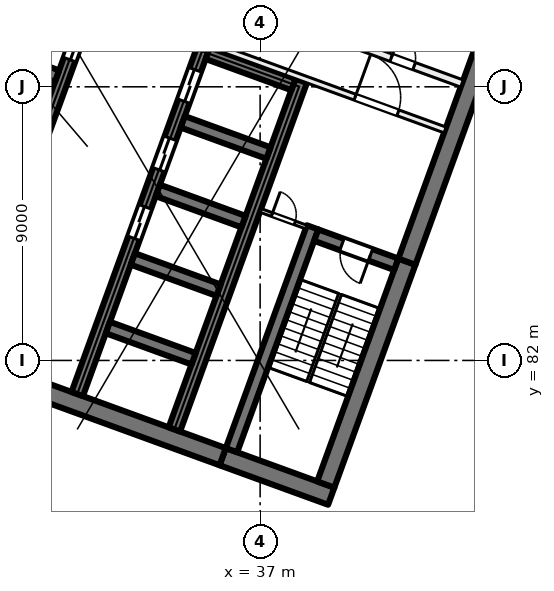
"""IFC4 building model, lengths in metres.
Left out: names, types, materials, properties, quantities, classifications, styles, units other than length and angle.
Written with IfcOpenShell. Run it as: python <this file> out.ifc"""

import sys

from ifc_helpers import new_model, si_unit, direction, frame, frame_2d, origin, place, context, subcontext, project, spatial, rectangle, extrude, element, fill, save


model = new_model("IFC4")
c1 = context("Model", 3, precision=1e-05, world=origin(), true_north=direction((0.0, 1.0)))
c2 = subcontext(c1, "Body", "Model", "MODEL_VIEW")
j1 = project(units=[si_unit("LENGTHUNIT", "METRE"), si_unit("PLANEANGLEUNIT", "RADIAN")], contexts=[c1])
p1 = place(None, origin())
s1 = spatial("IfcSite", under=j1, at=p1, CompositionType="ELEMENT")
p2 = place(p1, origin())
s2 = spatial("IfcBuilding", under=s1, at=p2, CompositionType="ELEMENT")
p3 = place(p2, frame((0.0, 0.0, 31.5)))
s3 = spatial("IfcBuildingStorey", under=s2, at=p3, CompositionType="ELEMENT", Elevation=31.5)
p4 = place(p3, frame((39.338, 77.535, 0.0), z_axis=(0.0, 0.0, 1.0), x_axis=(-0.939701471648, 0.341995824804, 0.0)))
e1 = element("IfcWall", 1, at=p4, inside=s3, PredefinedType="SHEAR", context=c2, shape_type="SweptSolid", body=[
    extrude(rectangle(XDim=3.8, YDim=0.6, at=frame_2d((1.9, 0.0))), origin(), (0.0, 0.0, 1.0), 4.0),
])
p5 = place(p3, frame((35.767, 78.835, 0.0), z_axis=(0.0, 0.0, 1.0), x_axis=(-0.939692894512, 0.342019391267, 0.0)))
e2 = element("IfcWall", 2, at=p5, inside=s3, PredefinedType="SHEAR", context=c2, shape_type="SweptSolid", body=[
    extrude(rectangle(XDim=14.4, YDim=0.6, at=frame_2d((7.2, 0.0))), origin(), (0.0, 0.0, 1.0), 4.0),
])
p6 = place(p3, frame((39.159, 77.92, 0.0), z_axis=(0.0, 0.0, 1.0), x_axis=(0.342016982193, 0.939693771338, 0.0)))
e3 = element("IfcWall", 3, at=p6, inside=s3, PredefinedType="SHEAR", context=c2, shape_type="SweptSolid", body=[
    extrude(rectangle(XDim=7.8, YDim=0.6, at=frame_2d((3.9, 0.0))), origin(), (0.0, 0.0, 1.0), 4.0),
])
p7 = place(p3, frame((41.827, 85.249, 0.0), z_axis=(0.0, 0.0, 1.0), x_axis=(0.342016162452, 0.939694069696, 0.0)))
e4 = element("IfcWall", 4, at=p7, inside=s3, PredefinedType="SHEAR", context=c2, shape_type="SweptSolid", body=[
    extrude(rectangle(XDim=8.9, YDim=0.6, at=frame_2d((4.45, 0.0))), origin(), (0.0, 0.0, 1.0), 4.0),
])
p8 = place(p3, frame((36.058, 79.048, 0.0), z_axis=(0.0, 0.0, 1.0), x_axis=(0.342016982193, 0.939693771338, 0.0)))
e5 = element("IfcWall", 5, at=p8, inside=s3, PredefinedType="SHEAR", context=c2, shape_type="SweptSolid", body=[
    extrude(rectangle(XDim=7.8, YDim=0.4, at=frame_2d((3.9, 0.0))), origin(), (0.0, 0.0, 1.0), 4.0),
])
p9 = place(p3, frame((41.476, 85.164, 0.0), z_axis=(0.0, 0.0, 1.0), x_axis=(-0.939678810556, 0.342058084236, 0.0)))
e6 = element("IfcWall", 6, at=p9, inside=s3, PredefinedType="SHEAR", context=c2, shape_type="SweptSolid", body=[
    extrude(rectangle(XDim=2.8, YDim=0.4, at=frame_2d((1.4, 0.0))), origin(), (0.0, 0.0, 1.0), 4.0),
])
p10 = place(p9, frame((0.9, 0.0, 0.0)))
e7 = element("IfcOpeningElement", 7, at=p10, cuts=e6, PredefinedType="OPENING", context=c2, shape_type="SweptSolid", body=[
    extrude(rectangle(XDim=1.0, YDim=2.1, at=frame_2d((0.5, 1.05))), frame((0.0, 0.21, 0.0), z_axis=(0.0, -1.0, 0.0), x_axis=(1.0, 0.0, 0.0)), (0.0, 0.0, 1.0), 0.42),
])
p11 = place(p3, frame((30.984, 80.895, 0.0), z_axis=(0.0, 0.0, 1.0), x_axis=(0.342021021735, 0.939692301071, 0.0)))
e8 = element("IfcWall", 8, at=p11, inside=s3, PredefinedType="SHEAR", context=c2, shape_type="SweptSolid", body=[
    extrude(rectangle(XDim=12.2, YDim=0.4, at=frame_2d((6.1, 0.0))), origin(), (0.0, 0.0, 1.0), 4.0),
])
p12 = place(p11, frame((5.45, 0.0, 0.0)))
e9 = element("IfcOpeningElement", 9, at=p12, cuts=e8, PredefinedType="OPENING", context=c2, shape_type="SweptSolid", body=[
    extrude(rectangle(XDim=1.1, YDim=2.1, at=frame_2d((0.55, 1.05))), frame((0.0, 0.21, 0.0), z_axis=(0.0, -1.0, 0.0), x_axis=(1.0, 0.0, 0.0)), (0.0, 0.0, 1.0), 0.42),
])
p13 = place(p11, frame((7.85, 0.0, 0.0)))
e10 = element("IfcOpeningElement", 10, at=p13, cuts=e8, PredefinedType="OPENING", context=c2, shape_type="SweptSolid", body=[
    extrude(rectangle(XDim=1.1, YDim=2.1, at=frame_2d((0.55, 1.05))), frame((0.0, 0.21, 0.0), z_axis=(0.0, -1.0, 0.0), x_axis=(1.0, 0.0, 0.0)), (0.0, 0.0, 1.0), 0.42),
])
p14 = place(p11, frame((10.25, 0.0, 0.0)))
e11 = element("IfcOpeningElement", 11, at=p14, cuts=e8, PredefinedType="OPENING", context=c2, shape_type="SweptSolid", body=[
    extrude(rectangle(XDim=1.1, YDim=2.1, at=frame_2d((0.55, 1.05))), frame((0.0, 0.21, 0.0), z_axis=(0.0, -1.0, 0.0), x_axis=(1.0, 0.0, 0.0)), (0.0, 0.0, 1.0), 0.42),
])
p15 = place(p3, frame((34.178, 79.732, 0.0), z_axis=(0.0, 0.0, 1.0), x_axis=(0.342014590177, 0.939694641948, 0.0)))
e12 = element("IfcWall", 12, at=p15, inside=s3, PredefinedType="SHEAR", context=c2, shape_type="SweptSolid", body=[
    extrude(rectangle(XDim=12.2, YDim=0.4, at=frame_2d((6.1, 0.0))), origin(), (0.0, 0.0, 1.0), 4.0),
])
for number, where, z_axis, x_axis in (
    (13, (34.812, 82.056, 0.0), (0.0, 0.0, 1.0), (-0.94, 0.342, 0.0)),
    (14, (35.632, 84.311, 0.0), (0.0, 0.0, 1.0), (-0.94, 0.342, 0.0)),
    (15, (36.453, 86.566, 0.0), (0.0, 0.0, 1.0), (-0.94, 0.342, 0.0)),
    (16, (37.274, 88.822, 0.0), (0.0, 0.0, 1.0), (-0.94, 0.342, 0.0)),
):
    element("IfcWall", number, at=place(p3, frame(where, z_axis=z_axis, x_axis=x_axis)), inside=s3, PredefinedType="SHEAR", context=c2, shape_type="SweptSolid", body=[
        extrude(rectangle(XDim=3.0, YDim=0.4, at=frame_2d((1.5, 0.0))), origin(), (0.0, 0.0, 1.0), 4.0),
    ])
p16 = place(p3, frame((38.095, 91.077, 0.0), z_axis=(0.0, 0.0, 1.0), x_axis=(-0.939676934218, 0.342063238742, 0.0)))
e17 = element("IfcWall", 17, at=p16, inside=s3, PredefinedType="SHEAR", context=c2, shape_type="SweptSolid", body=[
    extrude(rectangle(XDim=3.0, YDim=0.4, at=frame_2d((1.5, 0.0))), origin(), (0.0, 0.0, 1.0), 4.0),
])
p17 = place(p3, frame((27.225, 82.263, 0.0), z_axis=(0.0, 0.0, 1.0), x_axis=(0.342014590177, 0.939694641948, 0.0)))
e18 = element("IfcWall", 18, at=p17, inside=s3, PredefinedType="SHEAR", context=c2, shape_type="SweptSolid", body=[
    extrude(rectangle(XDim=12.2, YDim=0.4, at=frame_2d((6.1, 0.0))), origin(), (0.0, 0.0, 1.0), 4.0),
])
p18 = place(p17, frame((10.25, 0.0, 0.0)))
e19 = element("IfcOpeningElement", 19, at=p18, cuts=e18, PredefinedType="OPENING", context=c2, shape_type="SweptSolid", body=[
    extrude(rectangle(XDim=1.1, YDim=2.1, at=frame_2d((0.55, 1.05))), frame((0.0, 0.21, 0.0), z_axis=(0.0, -1.0, 0.0), x_axis=(1.0, 0.0, 0.0)), (0.0, 0.0, 1.0), 0.42),
])
p19 = place(p17, frame((0.7, 0.0, 0.0)))
e20 = element("IfcOpeningElement", 20, at=p19, cuts=e18, PredefinedType="OPENING", context=c2, shape_type="SweptSolid", body=[
    extrude(rectangle(XDim=0.8, YDim=2.1, at=frame_2d((0.4, 1.05))), frame((0.0, 0.21, 0.0), z_axis=(0.0, -1.0, 0.0), x_axis=(1.0, 0.0, 0.0)), (0.0, 0.0, 1.0), 0.42),
])
p20 = place(p3, frame((30.32, 91.353, 0.0), z_axis=(0.0, 0.0, 1.0), x_axis=(-0.939712609717, 0.341965219194, 0.0)))
e21 = element("IfcWall", 21, at=p20, inside=s3, PredefinedType="SHEAR", context=c2, shape_type="SweptSolid", body=[
    extrude(rectangle(XDim=3.0, YDim=0.4, at=frame_2d((1.5, 0.0))), origin(), (0.0, 0.0, 1.0), 4.0),
])
p21 = place(p3, frame((35.19, 92.453, 0.0), z_axis=(0.0, 0.0, 1.0), x_axis=(0.939691552312, -0.342023078919, 0.0)))
e22 = element("IfcWall", 22, at=p21, inside=s3, PredefinedType="PARTITIONING", context=c2, shape_type="SweptSolid", body=[
    extrude(rectangle(XDim=8.4, YDim=0.2, at=frame_2d((4.2, 0.0))), origin(), (0.0, 0.0, 1.0), 3.625),
])
p22 = place(p21, frame((5.25, 0.0, 0.0)))
e23 = element("IfcOpeningElement", 23, at=p22, cuts=e22, PredefinedType="OPENING", context=c2, shape_type="SweptSolid", body=[
    extrude(rectangle(XDim=1.5, YDim=2.1, at=frame_2d((0.75, 1.05))), frame((0.0, 0.11, 0.0), z_axis=(0.0, -1.0, 0.0), x_axis=(1.0, 0.0, 0.0)), (0.0, 0.0, 1.0), 0.22),
])
p23 = place(p3, frame((35.746, 93.98, 0.0), z_axis=(0.0, 0.0, 1.0), x_axis=(0.939691552312, -0.342023078919, 0.0)))
e24 = element("IfcWall", 24, at=p23, inside=s3, PredefinedType="PARTITIONING", context=c2, shape_type="SweptSolid", body=[
    extrude(rectangle(XDim=8.4, YDim=0.25, at=frame_2d((4.2, 0.0))), origin(), (0.0, 0.0, 1.0), 3.625),
])
p24 = place(p23, frame((1.675, 0.0, 0.0)))
e25 = element("IfcOpeningElement", 25, at=p24, cuts=e24, PredefinedType="OPENING", context=c2, shape_type="SweptSolid", body=[
    extrude(rectangle(XDim=0.8, YDim=2.1, at=frame_2d((0.4, 1.05))), frame((0.0, 0.135, 0.0), z_axis=(0.0, -1.0, 0.0), x_axis=(1.0, 0.0, 0.0)), (0.0, 0.0, 1.0), 0.27),
])
p25 = place(p23, frame((5.925, 0.0, 0.0)))
e26 = element("IfcOpeningElement", 26, at=p25, cuts=e24, PredefinedType="OPENING", context=c2, shape_type="SweptSolid", body=[
    extrude(rectangle(XDim=0.8, YDim=2.1, at=frame_2d((0.4, 1.05))), frame((0.0, 0.135, 0.0), z_axis=(0.0, -1.0, 0.0), x_axis=(1.0, 0.0, 0.0)), (0.0, 0.0, 1.0), 0.27),
])
p26 = place(p3, frame((37.013, 86.935, 0.0), z_axis=(0.0, 0.0, 1.0), x_axis=(0.939659694648, -0.342110593602, 0.0)))
e27 = element("IfcWall", 27, at=p26, inside=s3, PredefinedType="PARTITIONING", context=c2, shape_type="SweptSolid", body=[
    extrude(rectangle(XDim=1.6, YDim=0.125, at=frame_2d((0.8, 0.0))), origin(), (0.0, 0.0, 1.0), 3.625),
])
p27 = place(p26, frame((0.4, 0.0, 0.0)))
e28 = element("IfcOpeningElement", 28, at=p27, cuts=e27, PredefinedType="OPENING", context=c2, shape_type="SweptSolid", body=[
    extrude(rectangle(XDim=0.8, YDim=2.1, at=frame_2d((0.4, 1.05))), frame((0.0, 0.073, 0.0), z_axis=(0.0, -1.0, 0.0), x_axis=(1.0, 0.0, 0.0)), (0.0, 0.0, 1.0), 0.145),
])
p28 = place(p18, origin())
e29 = element("IfcDoor", 29, at=p28, inside=s3, OperationType="DOUBLE_DOOR_SLIDING", PredefinedType="DOOR", context=c2, shape_type="SweptSolid", body=[
    extrude(rectangle(XDim=1.1, YDim=2.1, at=frame_2d((0.55, 1.05))), frame((0.0, 0.025, 0.0), z_axis=(0.0, -1.0, 0.0), x_axis=(1.0, 0.0, 0.0)), (0.0, 0.0, 1.0), 0.05),
])
fill(e19, e29)
p29 = place(p12, origin())
e30 = element("IfcDoor", 30, at=p29, inside=s3, OperationType="DOUBLE_DOOR_SLIDING", PredefinedType="DOOR", context=c2, shape_type="SweptSolid", body=[
    extrude(rectangle(XDim=1.1, YDim=2.1, at=frame_2d((0.55, 1.05))), frame((0.0, 0.025, 0.0), z_axis=(0.0, -1.0, 0.0), x_axis=(1.0, 0.0, 0.0)), (0.0, 0.0, 1.0), 0.05),
])
fill(e9, e30)
p30 = place(p13, origin())
e31 = element("IfcDoor", 31, at=p30, inside=s3, OperationType="DOUBLE_DOOR_SLIDING", PredefinedType="DOOR", context=c2, shape_type="SweptSolid", body=[
    extrude(rectangle(XDim=1.1, YDim=2.1, at=frame_2d((0.55, 1.05))), frame((0.0, 0.025, 0.0), z_axis=(0.0, -1.0, 0.0), x_axis=(1.0, 0.0, 0.0)), (0.0, 0.0, 1.0), 0.05),
])
fill(e10, e31)
p31 = place(p14, origin())
e32 = element("IfcDoor", 32, at=p31, inside=s3, OperationType="DOUBLE_DOOR_SLIDING", PredefinedType="DOOR", context=c2, shape_type="SweptSolid", body=[
    extrude(rectangle(XDim=1.1, YDim=2.1, at=frame_2d((0.55, 1.05))), frame((0.0, 0.025, 0.0), z_axis=(0.0, -1.0, 0.0), x_axis=(1.0, 0.0, 0.0)), (0.0, 0.0, 1.0), 0.05),
])
fill(e11, e32)
p32 = place(p22, origin())
e33 = element("IfcDoor", 33, at=p32, inside=s3, OperationType="DOUBLE_DOOR_SINGLE_SWING", PredefinedType="DOOR", context=c2, shape_type="SweptSolid", body=[
    extrude(rectangle(XDim=1.5, YDim=2.1, at=frame_2d((0.75, 1.05))), frame((0.0, 0.025, 0.0), z_axis=(0.0, -1.0, 0.0), x_axis=(1.0, 0.0, 0.0)), (0.0, 0.0, 1.0), 0.05),
])
fill(e23, e33)
p33 = place(p10, origin())
e34 = element("IfcDoor", 34, at=p33, inside=s3, OperationType="SINGLE_SWING_RIGHT", PredefinedType="DOOR", context=c2, shape_type="SweptSolid", body=[
    extrude(rectangle(XDim=1.0, YDim=2.1, at=frame_2d((0.5, 1.05))), frame((0.0, 0.025, 0.0), z_axis=(0.0, -1.0, 0.0), x_axis=(1.0, 0.0, 0.0)), (0.0, 0.0, 1.0), 0.05),
])
fill(e7, e34)
p34 = place(p27, origin())
e35 = element("IfcDoor", 35, at=p34, inside=s3, OperationType="SINGLE_SWING_LEFT", PredefinedType="DOOR", context=c2, shape_type="SweptSolid", body=[
    extrude(rectangle(XDim=0.8, YDim=2.1, at=frame_2d((0.4, 1.05))), frame((0.0, 0.025, 0.0), z_axis=(0.0, -1.0, 0.0), x_axis=(1.0, 0.0, 0.0)), (0.0, 0.0, 1.0), 0.05),
])
fill(e28, e35)
p35 = place(p25, origin())
e36 = element("IfcDoor", 36, at=p35, inside=s3, OperationType="SINGLE_SWING_LEFT", PredefinedType="DOOR", context=c2, shape_type="SweptSolid", body=[
    extrude(rectangle(XDim=0.8, YDim=2.1, at=frame_2d((0.4, 1.05))), frame((0.0, 0.025, 0.0), z_axis=(0.0, -1.0, 0.0), x_axis=(1.0, 0.0, 0.0)), (0.0, 0.0, 1.0), 0.05),
])
fill(e26, e36)
save(model, sys.argv[1])
